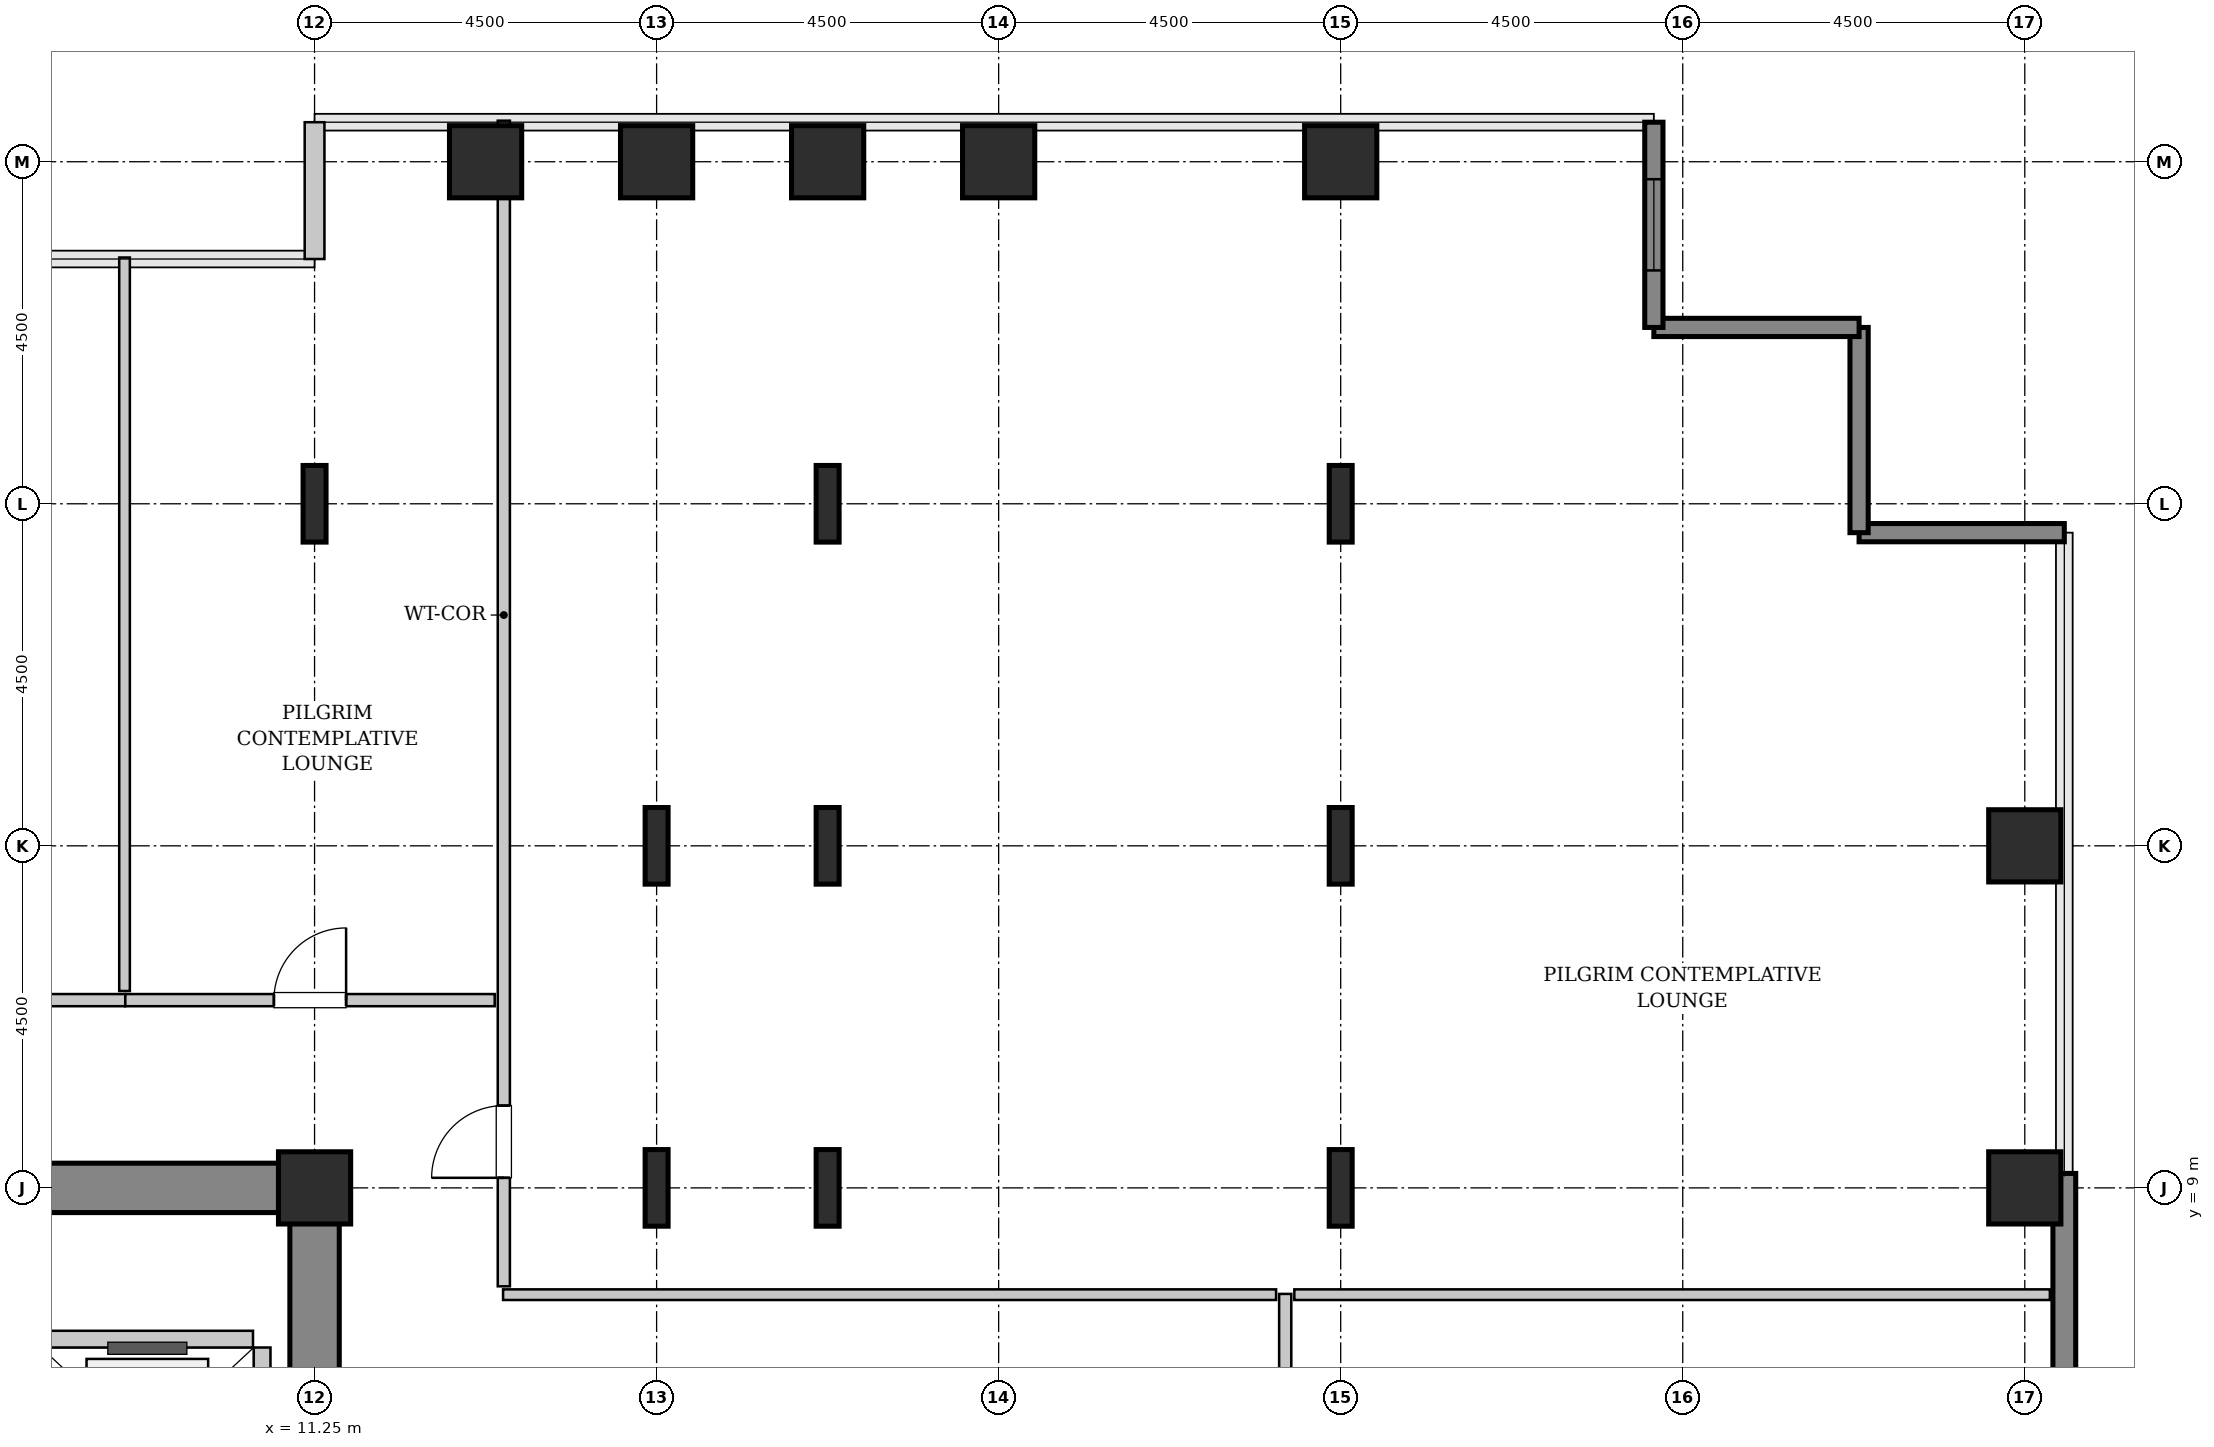
"""IFC4 building model, lengths in metres.
Left out: names, types, materials, properties, quantities, classifications, styles, units other than length and angle.
Written with IfcOpenShell. Run it as: python <this file> out.ifc"""

import sys

from ifc_helpers import new_model, si_unit, direction, frame, frame_2d, origin, origin_2d, place, context, subcontext, project, spatial, rectangle, hollow_rectangle, i_section, extrude, source, transform, mapped, element, fill, save


model = new_model("IFC4")
c1 = context("Model", 3, precision=1e-05, world=origin(), true_north=direction((0.0, 1.0)))
c2 = subcontext(c1, "Body", "Model", "MODEL_VIEW")
j1 = project(units=[si_unit("LENGTHUNIT", "METRE"), si_unit("PLANEANGLEUNIT", "RADIAN")], contexts=[c1])
p1 = place(None, origin())
s1 = spatial("IfcSite", under=j1, at=p1, CompositionType="ELEMENT")
p2 = place(p1, origin())
s2 = spatial("IfcBuilding", under=s1, at=p2, CompositionType="ELEMENT")
p3 = place(p2, frame((0.0, 0.0, 78.6)))
s3 = spatial("IfcBuildingStorey", under=s2, at=p3, CompositionType="ELEMENT", Elevation=78.6)
m1 = source(origin(), c2, "Body", "SweptSolid", [
    extrude(rectangle(XDim=10.025, YDim=0.65, at=frame_2d((5.012, 0.0))), origin(), (0.0, 0.0, 1.0), 3.8),
])
p4 = place(p3, frame((1.55, 9.0, 0.0), z_axis=(0.0, 0.0, 1.0), x_axis=(1.0, 0.0, 0.0)))
e1 = element("IfcWall", 1, at=p4, inside=s3, PredefinedType="SHEAR", context=c2, shape_type="MappedRepresentation", body=[
    mapped(m1, transform((0.0, 0.0, 0.0), x_axis=(1.0, 0.0, 0.0), y_axis=(0.0, 1.0, 0.0), z_axis=(0.0, 0.0, 1.0), scale=1.0)),
])
m2 = source(origin(), c2, "Body", "SweptSolid", [
    extrude(rectangle(XDim=7.325, YDim=0.65, at=frame_2d((3.663, 0.0))), origin(), (0.0, 0.0, 1.0), 3.8),
])
p5 = place(p3, frame((11.25, 1.35, 0.0), z_axis=(0.0, 0.0, 1.0), x_axis=(0.0, 1.0, 0.0)))
e2 = element("IfcWall", 2, at=p5, inside=s3, PredefinedType="SHEAR", context=c2, shape_type="MappedRepresentation", body=[
    mapped(m2, transform((0.0, 0.0, 0.0), x_axis=(1.0, 0.0, 0.0), y_axis=(0.0, 1.0, 0.0), z_axis=(0.0, 0.0, 1.0), scale=1.0)),
])
m3 = source(origin(), c2, "Body", "SweptSolid", [
    extrude(hollow_rectangle(XDim=0.95, YDim=0.95, WallThickness=0.045, InnerFilletRadius=0.045, OuterFilletRadius=0.09, at=origin_2d()), origin(), (0.0, 0.0, 1.0), 3.8),
])
p6 = place(p3, frame((11.25, 9.0, 0.0), z_axis=(0.0, 0.0, 1.0), x_axis=(1.0, 0.0, 0.0)))
e3 = element("IfcColumn", 3, at=p6, inside=s3, PredefinedType="COLUMN", context=c2, shape_type="MappedRepresentation", body=[
    mapped(m3, transform((0.0, 0.0, 0.0), x_axis=(1.0, 0.0, 0.0), y_axis=(0.0, 1.0, 0.0), z_axis=(0.0, 0.0, 1.0), scale=1.0)),
])
m4 = source(origin(), c2, "Body", "SweptSolid", [
    extrude(i_section(OverallWidth=0.302, OverallDepth=1.008, WebThickness=0.021, FlangeThickness=0.04, FilletRadius=0.03, at=origin_2d()), origin(), (0.0, 0.0, 1.0), 3.8),
])
p7 = place(p3, frame((11.25, 18.0, 0.0), z_axis=(0.0, 0.0, 1.0), x_axis=(1.0, 0.0, 0.0)))
e4 = element("IfcColumn", 4, at=p7, inside=s3, PredefinedType="COLUMN", context=c2, shape_type="MappedRepresentation", body=[
    mapped(m4, transform((0.0, 0.0, 0.0), x_axis=(1.0, 0.0, 0.0), y_axis=(0.0, 1.0, 0.0), z_axis=(0.0, 0.0, 1.0), scale=1.0)),
])
m5 = source(origin(), c2, "Body", "SweptSolid", [
    extrude(hollow_rectangle(XDim=0.95, YDim=0.95, WallThickness=0.045, InnerFilletRadius=0.045, OuterFilletRadius=0.09, at=origin_2d()), origin(), (0.0, 0.0, 1.0), 3.8),
])
p8 = place(p3, frame((13.5, 22.5, 0.0), z_axis=(0.0, 0.0, 1.0), x_axis=(1.0, 0.0, 0.0)))
e5 = element("IfcColumn", 5, at=p8, inside=s3, PredefinedType="COLUMN", context=c2, shape_type="MappedRepresentation", body=[
    mapped(m5, transform((0.0, 0.0, 0.0), x_axis=(1.0, 0.0, 0.0), y_axis=(0.0, 1.0, 0.0), z_axis=(0.0, 0.0, 1.0), scale=1.0)),
])
for number, where, z_axis, x_axis in (
    (6, (15.75, 9.0, 0.0), (0.0, 0.0, 1.0), (1.0, 0.0, 0.0)),
    (7, (15.75, 13.5, 0.0), (0.0, 0.0, 1.0), (1.0, 0.0, 0.0)),
):
    element("IfcColumn", number, at=place(p3, frame(where, z_axis=z_axis, x_axis=x_axis)), inside=s3, PredefinedType="COLUMN", context=c2, shape_type="MappedRepresentation", body=[
        mapped(m4, transform((0.0, 0.0, 0.0), x_axis=(1.0, 0.0, 0.0), y_axis=(0.0, 1.0, 0.0), z_axis=(0.0, 0.0, 1.0), scale=1.0)),
    ])
p9 = place(p3, frame((15.75, 22.5, 0.0), z_axis=(0.0, 0.0, 1.0), x_axis=(1.0, 0.0, 0.0)))
e8 = element("IfcColumn", 8, at=p9, inside=s3, PredefinedType="COLUMN", context=c2, shape_type="MappedRepresentation", body=[
    mapped(m5, transform((0.0, 0.0, 0.0), x_axis=(1.0, 0.0, 0.0), y_axis=(0.0, 1.0, 0.0), z_axis=(0.0, 0.0, 1.0), scale=1.0)),
])
for number, where, z_axis, x_axis in (
    (9, (18.0, 9.0, 0.0), (0.0, 0.0, 1.0), (1.0, 0.0, 0.0)),
    (10, (18.0, 13.5, 0.0), (0.0, 0.0, 1.0), (1.0, 0.0, 0.0)),
    (11, (18.0, 18.0, 0.0), (0.0, 0.0, 1.0), (1.0, 0.0, 0.0)),
):
    element("IfcColumn", number, at=place(p3, frame(where, z_axis=z_axis, x_axis=x_axis)), inside=s3, PredefinedType="COLUMN", context=c2, shape_type="MappedRepresentation", body=[
        mapped(m4, transform((0.0, 0.0, 0.0), x_axis=(1.0, 0.0, 0.0), y_axis=(0.0, 1.0, 0.0), z_axis=(0.0, 0.0, 1.0), scale=1.0)),
    ])
for number, where, z_axis, x_axis in (
    (12, (18.0, 22.5, 0.0), (0.0, 0.0, 1.0), (1.0, 0.0, 0.0)),
    (13, (20.25, 22.5, 0.0), (0.0, 0.0, 1.0), (1.0, 0.0, 0.0)),
):
    element("IfcColumn", number, at=place(p3, frame(where, z_axis=z_axis, x_axis=x_axis)), inside=s3, PredefinedType="COLUMN", context=c2, shape_type="MappedRepresentation", body=[
        mapped(m5, transform((0.0, 0.0, 0.0), x_axis=(1.0, 0.0, 0.0), y_axis=(0.0, 1.0, 0.0), z_axis=(0.0, 0.0, 1.0), scale=1.0)),
    ])
for number, where, z_axis, x_axis in (
    (14, (24.75, 9.0, 0.0), (0.0, 0.0, 1.0), (1.0, 0.0, 0.0)),
    (15, (24.75, 13.5, 0.0), (0.0, 0.0, 1.0), (1.0, 0.0, 0.0)),
    (16, (24.75, 18.0, 0.0), (0.0, 0.0, 1.0), (1.0, 0.0, 0.0)),
):
    element("IfcColumn", number, at=place(p3, frame(where, z_axis=z_axis, x_axis=x_axis)), inside=s3, PredefinedType="COLUMN", context=c2, shape_type="MappedRepresentation", body=[
        mapped(m4, transform((0.0, 0.0, 0.0), x_axis=(1.0, 0.0, 0.0), y_axis=(0.0, 1.0, 0.0), z_axis=(0.0, 0.0, 1.0), scale=1.0)),
    ])
for number, where, z_axis, x_axis in (
    (17, (24.75, 22.5, 0.0), (0.0, 0.0, 1.0), (1.0, 0.0, 0.0)),
    (18, (33.75, 9.0, 0.0), (0.0, 0.0, 1.0), (1.0, 0.0, 0.0)),
    (19, (33.75, 13.5, 0.0), (0.0, 0.0, 1.0), (1.0, 0.0, 0.0)),
):
    element("IfcColumn", number, at=place(p3, frame(where, z_axis=z_axis, x_axis=x_axis)), inside=s3, PredefinedType="COLUMN", context=c2, shape_type="MappedRepresentation", body=[
        mapped(m5, transform((0.0, 0.0, 0.0), x_axis=(1.0, 0.0, 0.0), y_axis=(0.0, 1.0, 0.0), z_axis=(0.0, 0.0, 1.0), scale=1.0)),
    ])
m6 = source(origin(), c2, "Body", "SweptSolid", [
    extrude(rectangle(XDim=4.88, YDim=0.3, at=frame_2d((2.44, 0.0))), origin(), (0.0, 0.0, 1.0), 3.55),
])
p10 = place(p3, frame((34.27, 4.31, 0.0), z_axis=(0.0, 0.0, 1.0), x_axis=(0.0, 1.0, 0.0)))
e20 = element("IfcWall", 20, at=p10, inside=s3, PredefinedType="SHEAR", context=c2, shape_type="MappedRepresentation", body=[
    mapped(m6, transform((0.0, 0.0, 0.0), x_axis=(1.0, 0.0, 0.0), y_axis=(0.0, 1.0, 0.0), z_axis=(0.0, 0.0, 1.0), scale=1.0)),
])
m7 = source(origin(), c2, "Body", "SweptSolid", [
    extrude(rectangle(XDim=2.7, YDim=0.24, at=frame_2d((1.35, 0.0))), origin(), (0.0, 0.0, 1.0), 3.55),
])
for number, where, z_axis, x_axis in (
    (21, (34.27, 17.62, 0.0), (0.0, 0.0, 1.0), (-1.0, 0.0, 0.0)),
    (22, (31.57, 17.62, 0.0), (0.0, 0.0, 1.0), (0.0, 1.0, 0.0)),
    (23, (31.57, 20.32, 0.0), (0.0, 0.0, 1.0), (-1.0, 0.0, 0.0)),
):
    element("IfcWall", number, at=place(p3, frame(where, z_axis=z_axis, x_axis=x_axis)), inside=s3, PredefinedType="SHEAR", context=c2, shape_type="MappedRepresentation", body=[
        mapped(m7, transform((0.0, 0.0, 0.0), x_axis=(1.0, 0.0, 0.0), y_axis=(0.0, 1.0, 0.0), z_axis=(0.0, 0.0, 1.0), scale=1.0)),
    ])
p11 = place(p3, frame((28.87, 20.32, 0.0), z_axis=(0.0, 0.0, 1.0), x_axis=(0.0, 1.0, 0.0)))
e24 = element("IfcWall", 24, at=p11, inside=s3, PredefinedType="SHEAR", context=c2, shape_type="MappedRepresentation", body=[
    mapped(m7, transform((0.0, 0.0, 0.0), x_axis=(1.0, 0.0, 0.0), y_axis=(0.0, 1.0, 0.0), z_axis=(0.0, 0.0, 1.0), scale=1.0)),
])
p12 = place(p11, frame((0.75, 0.0, 0.85)))
e25 = element("IfcOpeningElement", 25, at=p12, cuts=e24, PredefinedType="OPENING", context=c2, shape_type="SweptSolid", body=[
    extrude(rectangle(XDim=1.2, YDim=1.8, at=frame_2d((0.6, 0.9))), frame((0.0, 0.13, 0.0), z_axis=(0.0, -1.0, 0.0), x_axis=(1.0, 0.0, 0.0)), (0.0, 0.0, 1.0), 0.26),
])
m8 = source(origin(), c2, "Body", "SweptSolid", [
    extrude(rectangle(XDim=1.8, YDim=0.26, at=frame_2d((0.9, 0.0))), origin(), (0.0, 0.0, 1.0), 3.55),
])
p13 = place(p3, frame((11.25, 23.02, 0.0), z_axis=(0.0, 0.0, 1.0), x_axis=(0.0, -1.0, 0.0)))
e26 = element("IfcWall", 26, at=p13, inside=s3, PredefinedType="SOLIDWALL", context=c2, shape_type="MappedRepresentation", body=[
    mapped(m8, transform((0.0, 0.0, 0.0), x_axis=(1.0, 0.0, 0.0), y_axis=(0.0, 1.0, 0.0), z_axis=(0.0, 0.0, 1.0), scale=1.0)),
])
m9 = source(origin(), c2, "Body", "SweptSolid", [
    extrude(rectangle(XDim=5.45, YDim=0.22, at=frame_2d((2.725, 0.0))), origin(), (0.0, 0.0, 1.0), 3.535),
])
p14 = place(p3, frame((10.56, 1.45, 0.0), z_axis=(0.0, 0.0, 1.0), x_axis=(0.0, 1.0, 0.0)))
e27 = element("IfcWall", 27, at=p14, inside=s3, PredefinedType="SOLIDWALL", context=c2, shape_type="MappedRepresentation", body=[
    mapped(m9, transform((0.0, 0.0, 0.0), x_axis=(1.0, 0.0, 0.0), y_axis=(0.0, 1.0, 0.0), z_axis=(0.0, 0.0, 1.0), scale=1.0)),
])
m10 = source(origin(), c2, "Body", "SweptSolid", [
    extrude(rectangle(XDim=2.78, YDim=0.22, at=frame_2d((1.39, 0.0))), origin(), (0.0, 0.0, 1.0), 3.535),
])
p15 = place(p3, frame((10.44, 7.01, 0.0), z_axis=(0.0, 0.0, 1.0), x_axis=(-1.0, 0.0, 0.0)))
e28 = element("IfcWall", 28, at=p15, inside=s3, PredefinedType="SOLIDWALL", context=c2, shape_type="MappedRepresentation", body=[
    mapped(m10, transform((0.0, 0.0, 0.0), x_axis=(1.0, 0.0, 0.0), y_axis=(0.0, 1.0, 0.0), z_axis=(0.0, 0.0, 1.0), scale=1.0)),
])
m11 = source(origin(), c2, "Body", "SweptSolid", [
    extrude(rectangle(XDim=15.7, YDim=0.16, at=frame_2d((7.85, 0.0))), origin(), (0.0, 0.0, 1.0), 3.535),
])
p16 = place(p3, frame((24.02, -8.095, 0.0), z_axis=(0.0, 0.0, 1.0), x_axis=(0.0, 1.0, 0.0)))
e29 = element("IfcWall", 29, at=p16, inside=s3, PredefinedType="PARTITIONING", context=c2, shape_type="MappedRepresentation", body=[
    mapped(m11, transform((0.0, 0.0, 0.0), x_axis=(1.0, 0.0, 0.0), y_axis=(0.0, 1.0, 0.0), z_axis=(0.0, 0.0, 1.0), scale=1.0)),
])
p17 = place(p16, frame((9.87, 0.0, 0.0)))
e30 = element("IfcOpeningElement", 30, at=p17, cuts=e29, PredefinedType="OPENING", context=c2, shape_type="SweptSolid", body=[
    extrude(rectangle(XDim=0.95, YDim=2.1, at=frame_2d((0.475, 1.05))), frame((0.0, 0.09, 0.0), z_axis=(0.0, -1.0, 0.0), x_axis=(1.0, 0.0, 0.0)), (0.0, 0.0, 1.0), 0.18),
])
m12 = source(origin(), c2, "Body", "SweptSolid", [
    extrude(rectangle(XDim=10.17, YDim=0.14, at=frame_2d((5.085, 0.0))), origin(), (0.0, 0.0, 1.0), 3.535),
])
p18 = place(p3, frame((13.73, 7.595, 0.0), z_axis=(0.0, 0.0, 1.0), x_axis=(1.0, 0.0, 0.0)))
e31 = element("IfcWall", 31, at=p18, inside=s3, PredefinedType="PARTITIONING", context=c2, shape_type="MappedRepresentation", body=[
    mapped(m12, transform((0.0, 0.0, 0.0), x_axis=(1.0, 0.0, 0.0), y_axis=(0.0, 1.0, 0.0), z_axis=(0.0, 0.0, 1.0), scale=1.0)),
])
m13 = source(origin(), c2, "Body", "SweptSolid", [
    extrude(rectangle(XDim=9.94, YDim=0.14, at=frame_2d((4.97, 0.0))), origin(), (0.0, 0.0, 1.0), 3.535),
])
p19 = place(p3, frame((24.14, 7.595, 0.0), z_axis=(0.0, 0.0, 1.0), x_axis=(1.0, 0.0, 0.0)))
e32 = element("IfcWall", 32, at=p19, inside=s3, PredefinedType="PARTITIONING", context=c2, shape_type="MappedRepresentation", body=[
    mapped(m13, transform((0.0, 0.0, 0.0), x_axis=(1.0, 0.0, 0.0), y_axis=(0.0, 1.0, 0.0), z_axis=(0.0, 0.0, 1.0), scale=1.0)),
])
m14 = source(origin(), c2, "Body", "SweptSolid", [
    extrude(rectangle(XDim=15.335, YDim=0.16, at=frame_2d((7.667, 0.0))), origin(), (0.0, 0.0, 1.0), 3.535),
])
p20 = place(p3, frame((13.74, 7.705, 0.0), z_axis=(0.0, 0.0, 1.0), x_axis=(0.0, 1.0, 0.0)))
e33 = element("IfcWall", 33, at=p20, inside=s3, PredefinedType="PARTITIONING", context=c2, shape_type="MappedRepresentation", body=[
    mapped(m14, transform((0.0, 0.0, 0.0), x_axis=(1.0, 0.0, 0.0), y_axis=(0.0, 1.0, 0.0), z_axis=(0.0, 0.0, 1.0), scale=1.0)),
])
p21 = place(p20, frame((1.427, 0.0, 0.0)))
e34 = element("IfcOpeningElement", 34, at=p21, cuts=e33, PredefinedType="OPENING", context=c2, shape_type="SweptSolid", body=[
    extrude(rectangle(XDim=0.95, YDim=2.1, at=frame_2d((0.475, 1.05))), frame((0.0, 0.09, 0.0), z_axis=(0.0, -1.0, 0.0), x_axis=(1.0, 0.0, 0.0)), (0.0, 0.0, 1.0), 0.18),
])
m15 = source(origin(), c2, "Body", "SweptSolid", [
    extrude(rectangle(XDim=4.965, YDim=0.16, at=frame_2d((2.482, 0.0))), origin(), (0.0, 0.0, 1.0), 3.535),
])
p22 = place(p3, frame((3.795, 11.47, 0.0), z_axis=(0.0, 0.0, 1.0), x_axis=(1.0, 0.0, 0.0)))
e35 = element("IfcWall", 35, at=p22, inside=s3, PredefinedType="PARTITIONING", context=c2, shape_type="MappedRepresentation", body=[
    mapped(m15, transform((0.0, 0.0, 0.0), x_axis=(1.0, 0.0, 0.0), y_axis=(0.0, 1.0, 0.0), z_axis=(0.0, 0.0, 1.0), scale=1.0)),
])
p23 = place(p22, frame((2.008, 0.0, 0.0)))
e36 = element("IfcOpeningElement", 36, at=p23, cuts=e35, PredefinedType="OPENING", context=c2, shape_type="SweptSolid", body=[
    extrude(rectangle(XDim=0.95, YDim=2.1, at=frame_2d((0.475, 1.05))), frame((0.0, 0.09, 0.0), z_axis=(0.0, -1.0, 0.0), x_axis=(1.0, 0.0, 0.0)), (0.0, 0.0, 1.0), 0.18),
])
m16 = source(origin(), c2, "Body", "SweptSolid", [
    extrude(rectangle(XDim=9.65, YDim=0.14, at=frame_2d((4.825, 0.0))), origin(), (0.0, 0.0, 1.0), 3.535),
])
p24 = place(p3, frame((8.75, 11.59, 0.0), z_axis=(0.0, 0.0, 1.0), x_axis=(0.0, 1.0, 0.0)))
e37 = element("IfcWall", 37, at=p24, inside=s3, PredefinedType="PARTITIONING", context=c2, shape_type="MappedRepresentation", body=[
    mapped(m16, transform((0.0, 0.0, 0.0), x_axis=(1.0, 0.0, 0.0), y_axis=(0.0, 1.0, 0.0), z_axis=(0.0, 0.0, 1.0), scale=1.0)),
])
m17 = source(origin(), c2, "Body", "SweptSolid", [
    extrude(rectangle(XDim=4.86, YDim=0.16, at=frame_2d((2.43, 0.0))), origin(), (0.0, 0.0, 1.0), 3.535),
])
p25 = place(p3, frame((8.76, 11.47, 0.0), z_axis=(0.0, 0.0, 1.0), x_axis=(1.0, 0.0, 0.0)))
e38 = element("IfcWall", 38, at=p25, inside=s3, PredefinedType="PARTITIONING", context=c2, shape_type="MappedRepresentation", body=[
    mapped(m17, transform((0.0, 0.0, 0.0), x_axis=(1.0, 0.0, 0.0), y_axis=(0.0, 1.0, 0.0), z_axis=(0.0, 0.0, 1.0), scale=1.0)),
])
p26 = place(p25, frame((1.955, 0.0, 0.0)))
e39 = element("IfcOpeningElement", 39, at=p26, cuts=e38, PredefinedType="OPENING", context=c2, shape_type="SweptSolid", body=[
    extrude(rectangle(XDim=0.95, YDim=2.1, at=frame_2d((0.475, 1.05))), frame((0.0, 0.09, 0.0), z_axis=(0.0, -1.0, 0.0), x_axis=(1.0, 0.0, 0.0)), (0.0, 0.0, 1.0), 0.18),
])
m18 = source(origin(), c2, "Body", "SweptSolid", [
    extrude(rectangle(XDim=1.2, YDim=1.8, at=frame_2d((0.6, 0.9))), frame((0.0, 0.03, 0.0), z_axis=(0.0, -1.0, 0.0), x_axis=(1.0, 0.0, 0.0)), (0.0, 0.0, 1.0), 0.06),
])
p27 = place(p12, origin())
e40 = element("IfcWindow", 40, at=p27, inside=s3, PartitioningType="SINGLE_PANEL", PredefinedType="WINDOW", context=c2, shape_type="MappedRepresentation", body=[
    mapped(m18, transform((0.0, 0.0, 0.0), x_axis=(1.0, 0.0, 0.0), y_axis=(0.0, 1.0, 0.0), z_axis=(0.0, 0.0, 1.0), scale=1.0)),
])
fill(e25, e40)
m19 = source(origin(), c2, "Body", "SweptSolid", [
    extrude(rectangle(XDim=0.95, YDim=2.1, at=frame_2d((0.475, 1.05))), frame((0.0, 0.025, 0.0), z_axis=(0.0, -1.0, 0.0), x_axis=(1.0, 0.0, 0.0)), (0.0, 0.0, 1.0), 0.05),
])
p28 = place(p21, origin())
e41 = element("IfcDoor", 41, at=p28, inside=s3, OperationType="SINGLE_SWING_LEFT", PredefinedType="DOOR", context=c2, shape_type="MappedRepresentation", body=[
    mapped(m19, transform((0.0, 0.0, 0.0), x_axis=(1.0, 0.0, 0.0), y_axis=(0.0, 1.0, 0.0), z_axis=(0.0, 0.0, 1.0), scale=1.0)),
])
fill(e34, e41)
p29 = place(p26, origin())
e42 = element("IfcDoor", 42, at=p29, inside=s3, OperationType="SINGLE_SWING_RIGHT", PredefinedType="DOOR", context=c2, shape_type="MappedRepresentation", body=[
    mapped(m19, transform((0.0, 0.0, 0.0), x_axis=(1.0, 0.0, 0.0), y_axis=(0.0, 1.0, 0.0), z_axis=(0.0, 0.0, 1.0), scale=1.0)),
])
fill(e39, e42)
save(model, sys.argv[1])
